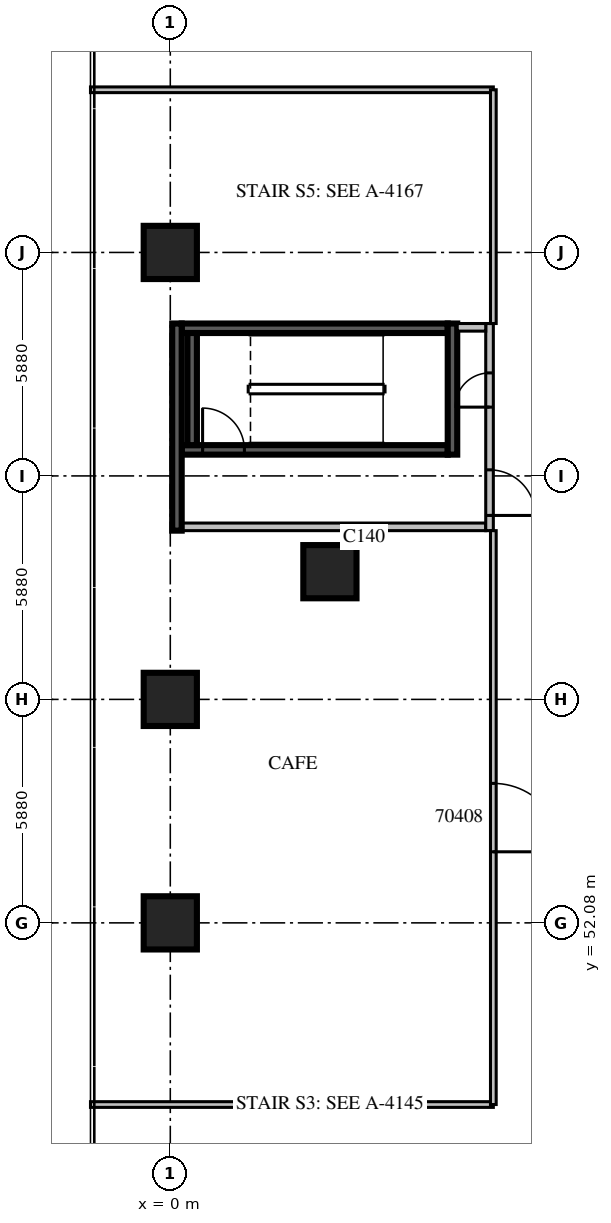
"""IFC4 building model, lengths in metres.
Left out: names, types, materials, properties, quantities, classifications, styles, units other than length and angle.
Written with IfcOpenShell. Run it as: python <this file> out.ifc"""

import sys

from ifc_helpers import new_model, si_unit, direction, frame, frame_2d, origin, origin_2d, place, context, subcontext, project, spatial, rectangle, extrude, source, transform, mapped, element, fill, save


model = new_model("IFC4")
c1 = context("Model", 3, precision=1e-05, world=origin(), true_north=direction((0.0, 1.0)))
c2 = subcontext(c1, "Body", "Model", "MODEL_VIEW")
j1 = project(units=[si_unit("LENGTHUNIT", "METRE"), si_unit("PLANEANGLEUNIT", "RADIAN")], contexts=[c1])
p1 = place(None, origin())
s1 = spatial("IfcSite", under=j1, at=p1, CompositionType="ELEMENT")
p2 = place(p1, origin())
s2 = spatial("IfcBuilding", under=s1, at=p2, CompositionType="ELEMENT")
p3 = place(p2, frame((0.0, 0.0, 7.5)))
s3 = spatial("IfcBuildingStorey", under=s2, at=p3, CompositionType="ELEMENT", Elevation=7.5)
m1 = source(origin(), c2, "Body", "SweptSolid", [
    extrude(rectangle(XDim=1.4, YDim=1.4, at=origin_2d()), origin(), (0.0, 0.0, 1.0), 5.4),
])
for number, where, z_axis, x_axis in (
    (1, (0.0, 52.08, 0.0), (0.0, 0.0, 1.0), (1.0, 0.0, 0.0)),
    (2, (0.0, 57.96, 0.0), (0.0, 0.0, 1.0), (1.0, 0.0, 0.0)),
    (3, (0.0, 69.72, 0.0), (0.0, 0.0, 1.0), (1.0, 0.0, 0.0)),
    (4, (4.2, 61.32, 0.0), (0.0, 0.0, 1.0), (1.0, 0.0, 0.0)),
):
    element("IfcColumn", number, at=place(p3, frame(where, z_axis=z_axis, x_axis=x_axis)), inside=s3, PredefinedType="COLUMN", context=c2, shape_type="MappedRepresentation", body=[
        mapped(m1, transform((0.0, 0.0, 0.0), scale=1.0)),
    ])
m2 = source(origin(), c2, "Body", "SweptSolid", [
    extrude(rectangle(XDim=7.0, YDim=0.25, at=frame_2d((3.5, 0.0))), origin(), (0.0, 0.0, 1.0), 4.8),
])
p4 = place(p3, frame((0.3, 64.525, 0.0), z_axis=(0.0, 0.0, 1.0), x_axis=(1.0, 0.0, 0.0)))
e5 = element("IfcWall", 5, at=p4, inside=s3, PredefinedType="SOLIDWALL", context=c2, shape_type="MappedRepresentation", body=[
    mapped(m2, transform((0.0, 0.0, 0.0), scale=1.0)),
])
m3 = source(origin(), c2, "Body", "SweptSolid", [
    extrude(rectangle(XDim=1.1, YDim=2.1, at=frame_2d((0.55, 1.05))), frame((0.0, 0.135, 0.0), z_axis=(0.0, -1.0, 0.0), x_axis=(1.0, 0.0, 0.0)), (0.0, 0.0, 1.0), 0.27),
])
p5 = place(p4, frame((0.55, 0.0, 0.0)))
e6 = element("IfcOpeningElement", 6, at=p5, cuts=e5, PredefinedType="OPENING", context=c2, shape_type="MappedRepresentation", body=[
    mapped(m3, transform((0.0, 0.0, 0.0), scale=1.0)),
])
p6 = place(p3, frame((0.3, 67.725, 0.0), z_axis=(0.0, 0.0, 1.0), x_axis=(1.0, 0.0, 0.0)))
e7 = element("IfcWall", 7, at=p6, inside=s3, PredefinedType="SOLIDWALL", context=c2, shape_type="MappedRepresentation", body=[
    mapped(m2, transform((0.0, 0.0, 0.0), scale=1.0)),
])
m4 = source(origin(), c2, "Body", "SweptSolid", [
    extrude(rectangle(XDim=3.45, YDim=0.25, at=frame_2d((1.725, 0.0))), origin(), (0.0, 0.0, 1.0), 4.8),
])
p7 = place(p3, frame((7.425, 64.4, 0.0), z_axis=(0.0, 0.0, 1.0), x_axis=(0.0, 1.0, 0.0)))
e8 = element("IfcWall", 8, at=p7, inside=s3, PredefinedType="SOLIDWALL", context=c2, shape_type="MappedRepresentation", body=[
    mapped(m4, transform((0.0, 0.0, 0.0), scale=1.0)),
])
m5 = source(origin(), c2, "Body", "SweptSolid", [
    extrude(rectangle(XDim=2.95, YDim=0.25, at=frame_2d((1.475, 0.0))), origin(), (0.0, 0.0, 1.0), 4.8),
])
p8 = place(p3, frame((0.575, 64.65, 0.0), z_axis=(0.0, 0.0, 1.0), x_axis=(0.0, 1.0, 0.0)))
e9 = element("IfcWall", 9, at=p8, inside=s3, PredefinedType="SOLIDWALL", context=c2, shape_type="MappedRepresentation", body=[
    mapped(m5, transform((0.0, 0.0, 0.0), scale=1.0)),
])
m6 = source(origin(), c2, "Body", "SweptSolid", [
    extrude(rectangle(XDim=8.0, YDim=0.2, at=frame_2d((4.0, 0.0))), origin(), (0.0, 0.0, 1.0), 4.8),
])
p9 = place(p3, frame((0.3, 62.5, 0.0), z_axis=(0.0, 0.0, 1.0), x_axis=(1.0, 0.0, 0.0)))
e10 = element("IfcWall", 10, at=p9, inside=s3, PredefinedType="PARTITIONING", context=c2, shape_type="MappedRepresentation", body=[
    mapped(m6, transform((0.0, 0.0, 0.0), scale=1.0)),
])
m7 = source(origin(), c2, "Body", "SweptSolid", [
    extrude(rectangle(XDim=5.45, YDim=0.2, at=frame_2d((2.725, 0.0))), origin(), (0.0, 0.0, 1.0), 4.8),
])
p10 = place(p3, frame((8.4, 62.4, 0.0), z_axis=(0.0, 0.0, 1.0), x_axis=(0.0, 1.0, 0.0)))
e11 = element("IfcWall", 11, at=p10, inside=s3, PredefinedType="PARTITIONING", context=c2, shape_type="MappedRepresentation", body=[
    mapped(m7, transform((0.0, 0.0, 0.0), scale=1.0)),
])
m8 = source(origin(), c2, "Body", "SweptSolid", [
    extrude(rectangle(XDim=1.2, YDim=2.1, at=frame_2d((0.6, 1.05))), frame((0.0, 0.11, 0.0), z_axis=(0.0, -1.0, 0.0), x_axis=(1.0, 0.0, 0.0)), (0.0, 0.0, 1.0), 0.22),
])
p11 = place(p10, frame((0.4, 0.0, 0.0)))
e12 = element("IfcOpeningElement", 12, at=p11, cuts=e11, PredefinedType="OPENING", context=c2, shape_type="MappedRepresentation", body=[
    mapped(m8, transform((0.0, 0.0, 0.0), scale=1.0)),
])
m9 = source(origin(), c2, "Body", "SweptSolid", [
    extrude(rectangle(XDim=0.9, YDim=2.1, at=frame_2d((0.45, 1.05))), frame((0.0, 0.11, 0.0), z_axis=(0.0, -1.0, 0.0), x_axis=(1.0, 0.0, 0.0)), (0.0, 0.0, 1.0), 0.22),
])
p12 = place(p10, frame((3.25, 0.0, 0.0)))
e13 = element("IfcOpeningElement", 13, at=p12, cuts=e11, PredefinedType="OPENING", context=c2, shape_type="MappedRepresentation", body=[
    mapped(m9, transform((0.0, 0.0, 0.0), scale=1.0)),
])
m10 = source(origin(), c2, "Body", "SweptSolid", [
    extrude(rectangle(XDim=0.75, YDim=0.2, at=frame_2d((0.375, 0.0))), origin(), (0.0, 0.0, 1.0), 4.8),
])
p13 = place(p3, frame((7.55, 67.75, 0.0), z_axis=(0.0, 0.0, 1.0), x_axis=(1.0, 0.0, 0.0)))
e14 = element("IfcWall", 14, at=p13, inside=s3, PredefinedType="PARTITIONING", context=c2, shape_type="MappedRepresentation", body=[
    mapped(m10, transform((0.0, 0.0, 0.0), scale=1.0)),
])
m11 = source(origin(), c2, "Body", "SweptSolid", [
    extrude(rectangle(XDim=5.45, YDim=0.25, at=frame_2d((2.725, 0.0))), origin(), (0.0, 0.0, 1.0), 4.8),
])
p14 = place(p3, frame((0.175, 62.4, 0.0), z_axis=(0.0, 0.0, 1.0), x_axis=(0.0, 1.0, 0.0)))
e15 = element("IfcWall", 15, at=p14, inside=s3, PredefinedType="SOLIDWALL", context=c2, shape_type="MappedRepresentation", body=[
    mapped(m11, transform((0.0, 0.0, 0.0), scale=1.0)),
])
p15 = place(p3, frame((-2.1, 47.3, 0.0), z_axis=(0.0, 0.0, 1.0), x_axis=(1.0, 0.0, 0.0)))
e16 = element("IfcWall", 16, at=p15, inside=s3, PredefinedType="PARTITIONING", context=c2, shape_type="SweptSolid", body=[
    extrude(rectangle(XDim=10.6, YDim=0.15, at=frame_2d((5.3, 0.0))), origin(), (0.0, 0.0, 1.0), 4.8),
])
m12 = source(origin(), c2, "Body", "SweptSolid", [
    extrude(rectangle(XDim=10.6, YDim=0.15, at=frame_2d((5.3, 0.0))), origin(), (0.0, 0.0, 1.0), 4.8),
])
p16 = place(p3, frame((-2.1, 74.0, 0.0), z_axis=(0.0, 0.0, 1.0), x_axis=(1.0, 0.0, 0.0)))
e17 = element("IfcWall", 17, at=p16, inside=s3, PredefinedType="PARTITIONING", context=c2, shape_type="MappedRepresentation", body=[
    mapped(m12, transform((0.0, 0.0, 0.0), scale=1.0)),
])
p17 = place(p3, frame((8.5, 47.3, 0.0), z_axis=(0.0, 0.0, 1.0), x_axis=(0.0, 1.0, 0.0)))
e18 = element("IfcWall", 18, at=p17, inside=s3, PredefinedType="PARTITIONING", context=c2, shape_type="SweptSolid", body=[
    extrude(rectangle(XDim=15.1, YDim=0.15, at=frame_2d((7.55, 0.0))), origin(), (0.0, 0.0, 1.0), 4.8),
])
m13 = source(origin(), c2, "Body", "SweptSolid", [
    extrude(rectangle(XDim=1.8, YDim=2.1, at=frame_2d((0.9, 1.05))), frame((0.0, 0.085, 0.0), z_axis=(0.0, -1.0, 0.0), x_axis=(1.0, 0.0, 0.0)), (0.0, 0.0, 1.0), 0.17),
])
p18 = place(p17, frame((6.65, 0.0, 0.0)))
e19 = element("IfcOpeningElement", 19, at=p18, cuts=e18, PredefinedType="OPENING", context=c2, shape_type="MappedRepresentation", body=[
    mapped(m13, transform((0.0, 0.0, 0.0), scale=1.0)),
])
p19 = place(p3, frame((8.5, 67.85, 0.0), z_axis=(0.0, 0.0, 1.0), x_axis=(0.0, 1.0, 0.0)))
e20 = element("IfcWall", 20, at=p19, inside=s3, PredefinedType="PARTITIONING", context=c2, shape_type="SweptSolid", body=[
    extrude(rectangle(XDim=6.15, YDim=0.15, at=frame_2d((3.075, 0.0))), origin(), (0.0, 0.0, 1.0), 4.8),
])
m14 = source(origin(), c2, "Body", "SweptSolid", [
    extrude(rectangle(XDim=1.1, YDim=2.1, at=frame_2d((0.55, 1.05))), frame((0.0, 0.025, 0.0), z_axis=(0.0, -1.0, 0.0), x_axis=(1.0, 0.0, 0.0)), (0.0, 0.0, 1.0), 0.05),
])
p20 = place(p5, origin())
e21 = element("IfcDoor", 21, at=p20, inside=s3, OperationType="SINGLE_SWING_LEFT", PredefinedType="DOOR", context=c2, shape_type="MappedRepresentation", body=[
    mapped(m14, transform((0.0, 0.0, 0.0), scale=1.0)),
])
fill(e6, e21)
m15 = source(origin(), c2, "Body", "SweptSolid", [
    extrude(rectangle(XDim=1.2, YDim=2.1, at=frame_2d((0.6, 1.05))), frame((0.0, 0.025, 0.0), z_axis=(0.0, -1.0, 0.0), x_axis=(1.0, 0.0, 0.0)), (0.0, 0.0, 1.0), 0.05),
])
p21 = place(p11, origin())
e22 = element("IfcDoor", 22, at=p21, inside=s3, OperationType="SINGLE_SWING_RIGHT", PredefinedType="DOOR", context=c2, shape_type="MappedRepresentation", body=[
    mapped(m15, transform((0.0, 0.0, 0.0), scale=1.0)),
])
fill(e12, e22)
m16 = source(origin(), c2, "Body", "SweptSolid", [
    extrude(rectangle(XDim=0.9, YDim=2.1, at=frame_2d((0.45, 1.05))), frame((0.0, 0.025, 0.0), z_axis=(0.0, -1.0, 0.0), x_axis=(1.0, 0.0, 0.0)), (0.0, 0.0, 1.0), 0.05),
])
p22 = place(p12, origin())
e23 = element("IfcDoor", 23, at=p22, inside=s3, OperationType="SINGLE_SWING_LEFT", PredefinedType="DOOR", context=c2, shape_type="MappedRepresentation", body=[
    mapped(m16, transform((0.0, 0.0, 0.0), scale=1.0)),
])
fill(e13, e23)
m17 = source(origin(), c2, "Body", "SweptSolid", [
    extrude(rectangle(XDim=1.8, YDim=2.1, at=frame_2d((0.9, 1.05))), frame((0.0, 0.025, 0.0), z_axis=(0.0, -1.0, 0.0), x_axis=(1.0, 0.0, 0.0)), (0.0, 0.0, 1.0), 0.05),
])
p23 = place(p18, origin())
e24 = element("IfcDoor", 24, at=p23, inside=s3, OperationType="DOUBLE_DOOR_SINGLE_SWING", PredefinedType="DOOR", context=c2, shape_type="MappedRepresentation", body=[
    mapped(m17, transform((0.0, 0.0, 0.0), scale=1.0)),
])
fill(e19, e24)
save(model, sys.argv[1])
